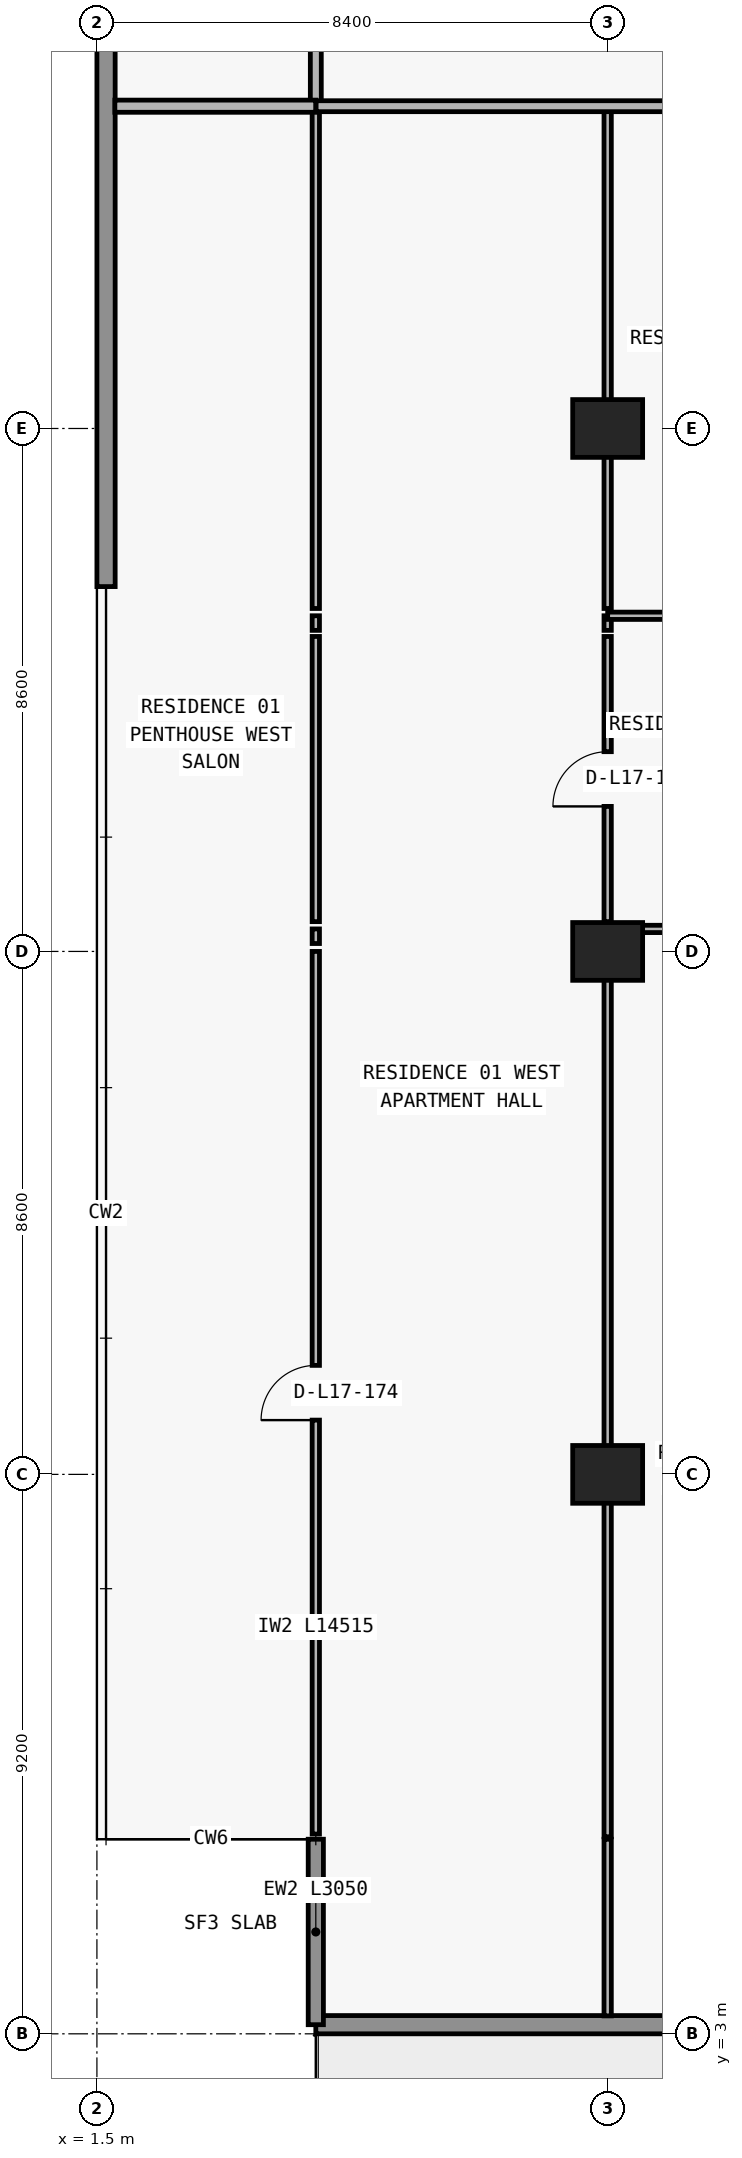
"""IFC4 building model, lengths in metres.
Left out: names, types, materials, properties, quantities, classifications, styles, units other than length and angle.
Written with IfcOpenShell. Run it as: python <this file> out.ifc"""

import sys

from ifc_helpers import new_model, si_unit, direction, frame, frame_2d, origin, origin_2d, place, context, subcontext, project, spatial, rectangle, extrude, element, fill, save


model = new_model("IFC4")
c1 = context("Model", 3, precision=1e-05, world=origin(), true_north=direction((0.0, 1.0)))
c2 = subcontext(c1, "Body", "Model", "MODEL_VIEW")
j1 = project(units=[si_unit("LENGTHUNIT", "METRE"), si_unit("PLANEANGLEUNIT", "RADIAN")], contexts=[c1])
p1 = place(None, origin())
s1 = spatial("IfcSite", under=j1, at=p1, CompositionType="ELEMENT")
p2 = place(p1, origin())
s2 = spatial("IfcBuilding", under=s1, at=p2, CompositionType="ELEMENT")
p3 = place(p2, frame((0.0, 0.0, 66.3)))
s3 = spatial("IfcBuildingStorey", under=s2, at=p3, CompositionType="ELEMENT", Elevation=66.3)
for number, where, z_axis, x_axis in (
    (1, (9.9, 12.2, 0.0), (0.0, 0.0, 1.0), (1.0, 0.0, 0.0)),
    (2, (9.9, 20.8, 0.0), (0.0, 0.0, 1.0), (1.0, 0.0, 0.0)),
    (3, (9.9, 29.4, 0.0), (0.0, 0.0, 1.0), (1.0, 0.0, 0.0)),
):
    element("IfcColumn", number, at=place(p3, frame(where, z_axis=z_axis, x_axis=x_axis)), inside=s3, PredefinedType="COLUMN", context=c2, shape_type="SweptSolid", body=[
        extrude(rectangle(XDim=1.15, YDim=0.95, at=origin_2d()), origin(), (0.0, 0.0, 1.0), 3.05),
    ])
p4 = place(p3, frame((72.7, 3.15, 0.0), z_axis=(0.0, 0.0, 1.0), x_axis=(-1.0, 0.0, 0.0)))
e4 = element("IfcWall", 4, at=p4, inside=s3, PredefinedType="STANDARD", context=c2, shape_type="SweptSolid", body=[
    extrude(rectangle(XDim=67.6, YDim=0.3, at=frame_2d((33.8, 0.0))), origin(), (0.0, 0.0, 1.0), 3.05),
])
p5 = place(p4, frame((59.826, 0.0, 0.0)))
e5 = element("IfcOpeningElement", 5, at=p5, cuts=e4, PredefinedType="OPENING", context=c2, shape_type="SweptSolid", body=[
    extrude(rectangle(XDim=2.0, YDim=2.3, at=frame_2d((1.0, 1.15))), frame((0.0, 0.16, 0.0), z_axis=(0.0, -1.0, 0.0), x_axis=(1.0, 0.0, 0.0)), (0.0, 0.0, 1.0), 0.32),
])
p6 = place(p4, frame((55.526, 0.0, 0.85)))
e6 = element("IfcOpeningElement", 6, at=p6, cuts=e4, PredefinedType="OPENING", context=c2, shape_type="SweptSolid", body=[
    extrude(rectangle(XDim=2.2, YDim=1.55, at=frame_2d((1.1, 0.775))), frame((0.0, 0.16, 0.0), z_axis=(0.0, -1.0, 0.0), x_axis=(1.0, 0.0, 0.0)), (0.0, 0.0, 1.0), 0.32),
])
p7 = place(p4, frame((51.09, 0.0, 0.0)))
e7 = element("IfcOpeningElement", 7, at=p7, cuts=e4, PredefinedType="OPENING", context=c2, shape_type="SweptSolid", body=[
    extrude(rectangle(XDim=2.0, YDim=2.3, at=frame_2d((1.0, 1.15))), frame((0.0, 0.16, 0.0), z_axis=(0.0, -1.0, 0.0), x_axis=(1.0, 0.0, 0.0)), (0.0, 0.0, 1.0), 0.32),
])
p8 = place(p4, frame((46.99, 0.0, 0.85)))
e8 = element("IfcOpeningElement", 8, at=p8, cuts=e4, PredefinedType="OPENING", context=c2, shape_type="SweptSolid", body=[
    extrude(rectangle(XDim=1.8, YDim=1.55, at=frame_2d((0.9, 0.775))), frame((0.0, 0.16, 0.0), z_axis=(0.0, -1.0, 0.0), x_axis=(1.0, 0.0, 0.0)), (0.0, 0.0, 1.0), 0.32),
])
p9 = place(p4, frame((43.026, 0.0, 0.0)))
e9 = element("IfcOpeningElement", 9, at=p9, cuts=e4, PredefinedType="OPENING", context=c2, shape_type="SweptSolid", body=[
    extrude(rectangle(XDim=2.0, YDim=2.3, at=frame_2d((1.0, 1.15))), frame((0.0, 0.16, 0.0), z_axis=(0.0, -1.0, 0.0), x_axis=(1.0, 0.0, 0.0)), (0.0, 0.0, 1.0), 0.32),
])
p10 = place(p4, frame((38.726, 0.0, 0.85)))
e10 = element("IfcOpeningElement", 10, at=p10, cuts=e4, PredefinedType="OPENING", context=c2, shape_type="SweptSolid", body=[
    extrude(rectangle(XDim=2.2, YDim=1.55, at=frame_2d((1.1, 0.775))), frame((0.0, 0.16, 0.0), z_axis=(0.0, -1.0, 0.0), x_axis=(1.0, 0.0, 0.0)), (0.0, 0.0, 1.0), 0.32),
])
p11 = place(p4, frame((34.51, 0.0, 0.0)))
e11 = element("IfcOpeningElement", 11, at=p11, cuts=e4, PredefinedType="OPENING", context=c2, shape_type="SweptSolid", body=[
    extrude(rectangle(XDim=2.0, YDim=2.3, at=frame_2d((1.0, 1.15))), frame((0.0, 0.16, 0.0), z_axis=(0.0, -1.0, 0.0), x_axis=(1.0, 0.0, 0.0)), (0.0, 0.0, 1.0), 0.32),
])
p12 = place(p4, frame((30.81, 0.0, 0.85)))
e12 = element("IfcOpeningElement", 12, at=p12, cuts=e4, PredefinedType="OPENING", context=c2, shape_type="SweptSolid", body=[
    extrude(rectangle(XDim=1.8, YDim=1.55, at=frame_2d((0.9, 0.775))), frame((0.0, 0.16, 0.0), z_axis=(0.0, -1.0, 0.0), x_axis=(1.0, 0.0, 0.0)), (0.0, 0.0, 1.0), 0.32),
])
p13 = place(p4, frame((27.026, 0.0, 0.0)))
e13 = element("IfcOpeningElement", 13, at=p13, cuts=e4, PredefinedType="OPENING", context=c2, shape_type="SweptSolid", body=[
    extrude(rectangle(XDim=2.0, YDim=2.3, at=frame_2d((1.0, 1.15))), frame((0.0, 0.16, 0.0), z_axis=(0.0, -1.0, 0.0), x_axis=(1.0, 0.0, 0.0)), (0.0, 0.0, 1.0), 0.32),
])
p14 = place(p4, frame((22.726, 0.0, 0.85)))
e14 = element("IfcOpeningElement", 14, at=p14, cuts=e4, PredefinedType="OPENING", context=c2, shape_type="SweptSolid", body=[
    extrude(rectangle(XDim=2.2, YDim=1.55, at=frame_2d((1.1, 0.775))), frame((0.0, 0.16, 0.0), z_axis=(0.0, -1.0, 0.0), x_axis=(1.0, 0.0, 0.0)), (0.0, 0.0, 1.0), 0.32),
])
p15 = place(p4, frame((18.29, 0.0, 0.0)))
e15 = element("IfcOpeningElement", 15, at=p15, cuts=e4, PredefinedType="OPENING", context=c2, shape_type="SweptSolid", body=[
    extrude(rectangle(XDim=2.0, YDim=2.3, at=frame_2d((1.0, 1.15))), frame((0.0, 0.16, 0.0), z_axis=(0.0, -1.0, 0.0), x_axis=(1.0, 0.0, 0.0)), (0.0, 0.0, 1.0), 0.32),
])
p16 = place(p4, frame((14.19, 0.0, 0.85)))
e16 = element("IfcOpeningElement", 16, at=p16, cuts=e4, PredefinedType="OPENING", context=c2, shape_type="SweptSolid", body=[
    extrude(rectangle(XDim=1.8, YDim=1.55, at=frame_2d((0.9, 0.775))), frame((0.0, 0.16, 0.0), z_axis=(0.0, -1.0, 0.0), x_axis=(1.0, 0.0, 0.0)), (0.0, 0.0, 1.0), 0.32),
])
p17 = place(p4, frame((10.226, 0.0, 0.0)))
e17 = element("IfcOpeningElement", 17, at=p17, cuts=e4, PredefinedType="OPENING", context=c2, shape_type="SweptSolid", body=[
    extrude(rectangle(XDim=2.0, YDim=2.3, at=frame_2d((1.0, 1.15))), frame((0.0, 0.16, 0.0), z_axis=(0.0, -1.0, 0.0), x_axis=(1.0, 0.0, 0.0)), (0.0, 0.0, 1.0), 0.32),
])
p18 = place(p4, frame((5.926, 0.0, 0.85)))
e18 = element("IfcOpeningElement", 18, at=p18, cuts=e4, PredefinedType="OPENING", context=c2, shape_type="SweptSolid", body=[
    extrude(rectangle(XDim=2.2, YDim=1.55, at=frame_2d((1.1, 0.775))), frame((0.0, 0.16, 0.0), z_axis=(0.0, -1.0, 0.0), x_axis=(1.0, 0.0, 0.0)), (0.0, 0.0, 1.0), 0.32),
])
p19 = place(p3, frame((5.1, 6.2, 0.0), z_axis=(0.0, 0.0, 1.0), x_axis=(0.0, -1.0, 0.0)))
e19 = element("IfcWall", 19, at=p19, inside=s3, PredefinedType="ELEMENTEDWALL", context=c2, shape_type="SweptSolid", body=[
    extrude(rectangle(XDim=3.05, YDim=0.25, at=frame_2d((1.525, 0.0))), origin(), (0.0, 0.0, 1.0), 3.05),
])
p20 = place(p3, frame((1.65, 26.8, 0.0), z_axis=(0.0, 0.0, 1.0), x_axis=(0.0, 1.0, 0.0)))
e20 = element("IfcWall", 20, at=p20, inside=s3, PredefinedType="STANDARD", context=c2, shape_type="SweptSolid", body=[
    extrude(rectangle(XDim=20.6, YDim=0.3, at=frame_2d((10.3, 0.0))), origin(), (0.0, 0.0, 1.0), 3.05),
])
p21 = place(p3, frame((5.1, 6.285, 0.0), z_axis=(0.0, 0.0, 1.0), x_axis=(0.0, 1.0, 0.0)))
e21 = element("IfcWall", 21, at=p21, inside=s3, PredefinedType="PARTITIONING", context=c2, shape_type="SweptSolid", body=[
    extrude(rectangle(XDim=14.515, YDim=0.12, at=frame_2d((7.258, 0.0))), origin(), (0.0, 0.0, 1.0), 3.05),
])
p22 = place(p21, frame((6.808, 0.0, 0.0)))
e22 = element("IfcOpeningElement", 22, at=p22, cuts=e21, PredefinedType="OPENING", context=c2, shape_type="SweptSolid", body=[
    extrude(rectangle(XDim=0.9, YDim=2.15, at=frame_2d((0.45, 1.075))), frame((0.0, 0.07, 0.0), z_axis=(0.0, -1.0, 0.0), x_axis=(1.0, 0.0, 0.0)), (0.0, 0.0, 1.0), 0.14),
])
p23 = place(p3, frame((5.1, 20.93, 0.0), z_axis=(0.0, 0.0, 1.0), x_axis=(0.0, 1.0, 0.0)))
e23 = element("IfcWall", 23, at=p23, inside=s3, PredefinedType="PARTITIONING", context=c2, shape_type="SweptSolid", body=[
    extrude(rectangle(XDim=0.24, YDim=0.12, at=frame_2d((0.12, 0.0))), origin(), (0.0, 0.0, 1.0), 3.05),
])
p24 = place(p3, frame((5.1, 21.29, 0.0), z_axis=(0.0, 0.0, 1.0), x_axis=(0.0, 1.0, 0.0)))
e24 = element("IfcWall", 24, at=p24, inside=s3, PredefinedType="PARTITIONING", context=c2, shape_type="SweptSolid", body=[
    extrude(rectangle(XDim=4.69, YDim=0.12, at=frame_2d((2.345, 0.0))), origin(), (0.0, 0.0, 1.0), 3.05),
])
p25 = place(p3, frame((5.1, 26.08, 0.0), z_axis=(0.0, 0.0, 1.0), x_axis=(0.0, 1.0, 0.0)))
e25 = element("IfcWall", 25, at=p25, inside=s3, PredefinedType="PARTITIONING", context=c2, shape_type="SweptSolid", body=[
    extrude(rectangle(XDim=0.24, YDim=0.12, at=frame_2d((0.12, 0.0))), origin(), (0.0, 0.0, 1.0), 3.05),
])
p26 = place(p3, frame((5.1, 26.44, 0.0), z_axis=(0.0, 0.0, 1.0), x_axis=(0.0, 1.0, 0.0)))
e26 = element("IfcWall", 26, at=p26, inside=s3, PredefinedType="PARTITIONING", context=c2, shape_type="SweptSolid", body=[
    extrude(rectangle(XDim=8.26, YDim=0.12, at=frame_2d((4.13, 0.0))), origin(), (0.0, 0.0, 1.0), 3.05),
])
p27 = place(p3, frame((5.1, 34.705, 0.0), z_axis=(0.0, 0.0, 1.0), x_axis=(0.0, 1.0, 0.0)))
e27 = element("IfcWall", 27, at=p27, inside=s3, PredefinedType="PARTITIONING", context=c2, shape_type="SweptSolid", body=[
    extrude(rectangle(XDim=2.195, YDim=0.18, at=frame_2d((1.097, 0.0))), origin(), (0.0, 0.0, 1.0), 3.05),
])
p28 = place(p3, frame((9.9, 3.295, 0.0), z_axis=(0.0, 0.0, 1.0), x_axis=(0.0, 1.0, 0.0)))
e28 = element("IfcWall", 28, at=p28, inside=s3, PredefinedType="PARTITIONING", context=c2, shape_type="SweptSolid", body=[
    extrude(rectangle(XDim=2.905, YDim=0.12, at=frame_2d((1.453, 0.0))), origin(), (0.0, 0.0, 1.0), 3.05),
])
p29 = place(p3, frame((9.9, 6.24, 0.0), z_axis=(0.0, 0.0, 1.0), x_axis=(0.0, 1.0, 0.0)))
e29 = element("IfcWall", 29, at=p29, inside=s3, PredefinedType="PARTITIONING", context=c2, shape_type="SweptSolid", body=[
    extrude(rectangle(XDim=14.56, YDim=0.12, at=frame_2d((7.28, 0.0))), origin(), (0.0, 0.0, 1.0), 2.11),
])
p30 = place(p3, frame((9.9, 20.93, 0.0), z_axis=(0.0, 0.0, 1.0), x_axis=(0.0, 1.0, 0.0)))
e30 = element("IfcWall", 30, at=p30, inside=s3, PredefinedType="PARTITIONING", context=c2, shape_type="SweptSolid", body=[
    extrude(rectangle(XDim=0.24, YDim=0.12, at=frame_2d((0.12, 0.0))), origin(), (0.0, 0.0, 1.0), 3.05),
])
p31 = place(p3, frame((9.9, 21.29, 0.0), z_axis=(0.0, 0.0, 1.0), x_axis=(0.0, 1.0, 0.0)))
e31 = element("IfcWall", 31, at=p31, inside=s3, PredefinedType="PARTITIONING", context=c2, shape_type="SweptSolid", body=[
    extrude(rectangle(XDim=4.69, YDim=0.12, at=frame_2d((2.345, 0.0))), origin(), (0.0, 0.0, 1.0), 2.11),
])
p32 = place(p31, frame((1.895, 0.0, 0.0)))
e32 = element("IfcOpeningElement", 32, at=p32, cuts=e31, PredefinedType="OPENING", context=c2, shape_type="SweptSolid", body=[
    extrude(rectangle(XDim=0.9, YDim=2.06, at=frame_2d((0.45, 1.03))), frame((0.0, 0.07, 0.0), z_axis=(0.0, -1.0, 0.0), x_axis=(1.0, 0.0, 0.0)), (0.0, 0.0, 1.0), 0.14),
])
p33 = place(p3, frame((9.9, 26.08, 0.0), z_axis=(0.0, 0.0, 1.0), x_axis=(0.0, 1.0, 0.0)))
e33 = element("IfcWall", 33, at=p33, inside=s3, PredefinedType="PARTITIONING", context=c2, shape_type="SweptSolid", body=[
    extrude(rectangle(XDim=0.24, YDim=0.12, at=frame_2d((0.12, 0.0))), origin(), (0.0, 0.0, 1.0), 2.11),
])
p34 = place(p3, frame((9.9, 26.44, 0.0), z_axis=(0.0, 0.0, 1.0), x_axis=(0.0, 1.0, 0.0)))
e34 = element("IfcWall", 34, at=p34, inside=s3, PredefinedType="PARTITIONING", context=c2, shape_type="SweptSolid", body=[
    extrude(rectangle(XDim=8.26, YDim=0.12, at=frame_2d((4.13, 0.0))), origin(), (0.0, 0.0, 1.0), 2.11),
])
p35 = place(p3, frame((9.9, 21.17, 0.0), z_axis=(0.0, 0.0, 1.0), x_axis=(1.0, 0.0, 0.0)))
e35 = element("IfcWall", 35, at=p35, inside=s3, PredefinedType="PARTITIONING", context=c2, shape_type="SweptSolid", body=[
    extrude(rectangle(XDim=8.4, YDim=0.12, at=frame_2d((4.2, 0.0))), origin(), (0.0, 0.0, 1.0), 3.05),
])
p36 = place(p35, frame((1.524, 0.0, 0.0)))
e36 = element("IfcOpeningElement", 36, at=p36, cuts=e35, PredefinedType="OPENING", context=c2, shape_type="SweptSolid", body=[
    extrude(rectangle(XDim=0.9, YDim=2.15, at=frame_2d((0.45, 1.075))), frame((0.0, 0.07, 0.0), z_axis=(0.0, -1.0, 0.0), x_axis=(1.0, 0.0, 0.0)), (0.0, 0.0, 1.0), 0.14),
])
p37 = place(p35, frame((6.143, 0.0, 0.0)))
e37 = element("IfcOpeningElement", 37, at=p37, cuts=e35, PredefinedType="OPENING", context=c2, shape_type="SweptSolid", body=[
    extrude(rectangle(XDim=0.9, YDim=2.15, at=frame_2d((0.45, 1.075))), frame((0.0, 0.07, 0.0), z_axis=(0.0, -1.0, 0.0), x_axis=(1.0, 0.0, 0.0)), (0.0, 0.0, 1.0), 0.14),
])
p38 = place(p3, frame((9.9, 26.32, 0.0), z_axis=(0.0, 0.0, 1.0), x_axis=(1.0, 0.0, 0.0)))
e38 = element("IfcWall", 38, at=p38, inside=s3, PredefinedType="PARTITIONING", context=c2, shape_type="SweptSolid", body=[
    extrude(rectangle(XDim=8.4, YDim=0.12, at=frame_2d((4.2, 0.0))), origin(), (0.0, 0.0, 1.0), 3.05),
])
p39 = place(p38, frame((1.943, 0.0, 0.0)))
e39 = element("IfcOpeningElement", 39, at=p39, cuts=e38, PredefinedType="OPENING", context=c2, shape_type="SweptSolid", body=[
    extrude(rectangle(XDim=0.9, YDim=2.15, at=frame_2d((0.45, 1.075))), frame((0.0, 0.07, 0.0), z_axis=(0.0, -1.0, 0.0), x_axis=(1.0, 0.0, 0.0)), (0.0, 0.0, 1.0), 0.14),
])
p40 = place(p3, frame((1.795, 34.7, 0.0), z_axis=(0.0, 0.0, 1.0), x_axis=(1.0, 0.0, 0.0)))
e40 = element("IfcWall", 40, at=p40, inside=s3, PredefinedType="PARTITIONING", context=c2, shape_type="SweptSolid", body=[
    extrude(rectangle(XDim=3.305, YDim=0.2, at=frame_2d((1.653, 0.0))), origin(), (0.0, 0.0, 1.0), 3.05),
])
p41 = place(p3, frame((5.105, 34.7, 0.0), z_axis=(0.0, 0.0, 1.0), x_axis=(1.0, 0.0, 0.0)))
e41 = element("IfcWall", 41, at=p41, inside=s3, PredefinedType="PARTITIONING", context=c2, shape_type="SweptSolid", body=[
    extrude(rectangle(XDim=21.545, YDim=0.18, at=frame_2d((10.772, 0.0))), origin(), (0.0, 0.0, 1.0), 3.05),
])
p42 = place(p41, frame((7.67, 0.0, 0.0)))
e42 = element("IfcOpeningElement", 42, at=p42, cuts=e41, PredefinedType="OPENING", context=c2, shape_type="SweptSolid", body=[
    extrude(rectangle(XDim=1.0, YDim=2.2, at=frame_2d((0.5, 1.1))), frame((0.0, 0.1, 0.0), z_axis=(0.0, -1.0, 0.0), x_axis=(1.0, 0.0, 0.0)), (0.0, 0.0, 1.0), 0.2),
])
p43 = place(p41, frame((16.07, 0.0, 0.0)))
e43 = element("IfcOpeningElement", 43, at=p43, cuts=e41, PredefinedType="OPENING", context=c2, shape_type="SweptSolid", body=[
    extrude(rectangle(XDim=1.0, YDim=2.2, at=frame_2d((0.5, 1.1))), frame((0.0, 0.1, 0.0), z_axis=(0.0, -1.0, 0.0), x_axis=(1.0, 0.0, 0.0)), (0.0, 0.0, 1.0), 0.2),
])
p44 = place(p32, origin())
e44 = element("IfcDoor", 44, at=p44, inside=s3, OperationType="SINGLE_SWING_LEFT", PredefinedType="DOOR", context=c2, shape_type="SweptSolid", body=[
    extrude(rectangle(XDim=0.9, YDim=2.06, at=frame_2d((0.45, 1.03))), frame((0.0, 0.025, 0.0), z_axis=(0.0, -1.0, 0.0), x_axis=(1.0, 0.0, 0.0)), (0.0, 0.0, 1.0), 0.05),
])
fill(e32, e44)
p45 = place(p22, origin())
e45 = element("IfcDoor", 45, at=p45, inside=s3, OperationType="SINGLE_SWING_LEFT", PredefinedType="DOOR", context=c2, shape_type="SweptSolid", body=[
    extrude(rectangle(XDim=0.9, YDim=2.15, at=frame_2d((0.45, 1.075))), frame((0.0, 0.025, 0.0), z_axis=(0.0, -1.0, 0.0), x_axis=(1.0, 0.0, 0.0)), (0.0, 0.0, 1.0), 0.05),
])
fill(e22, e45)
save(model, sys.argv[1])
